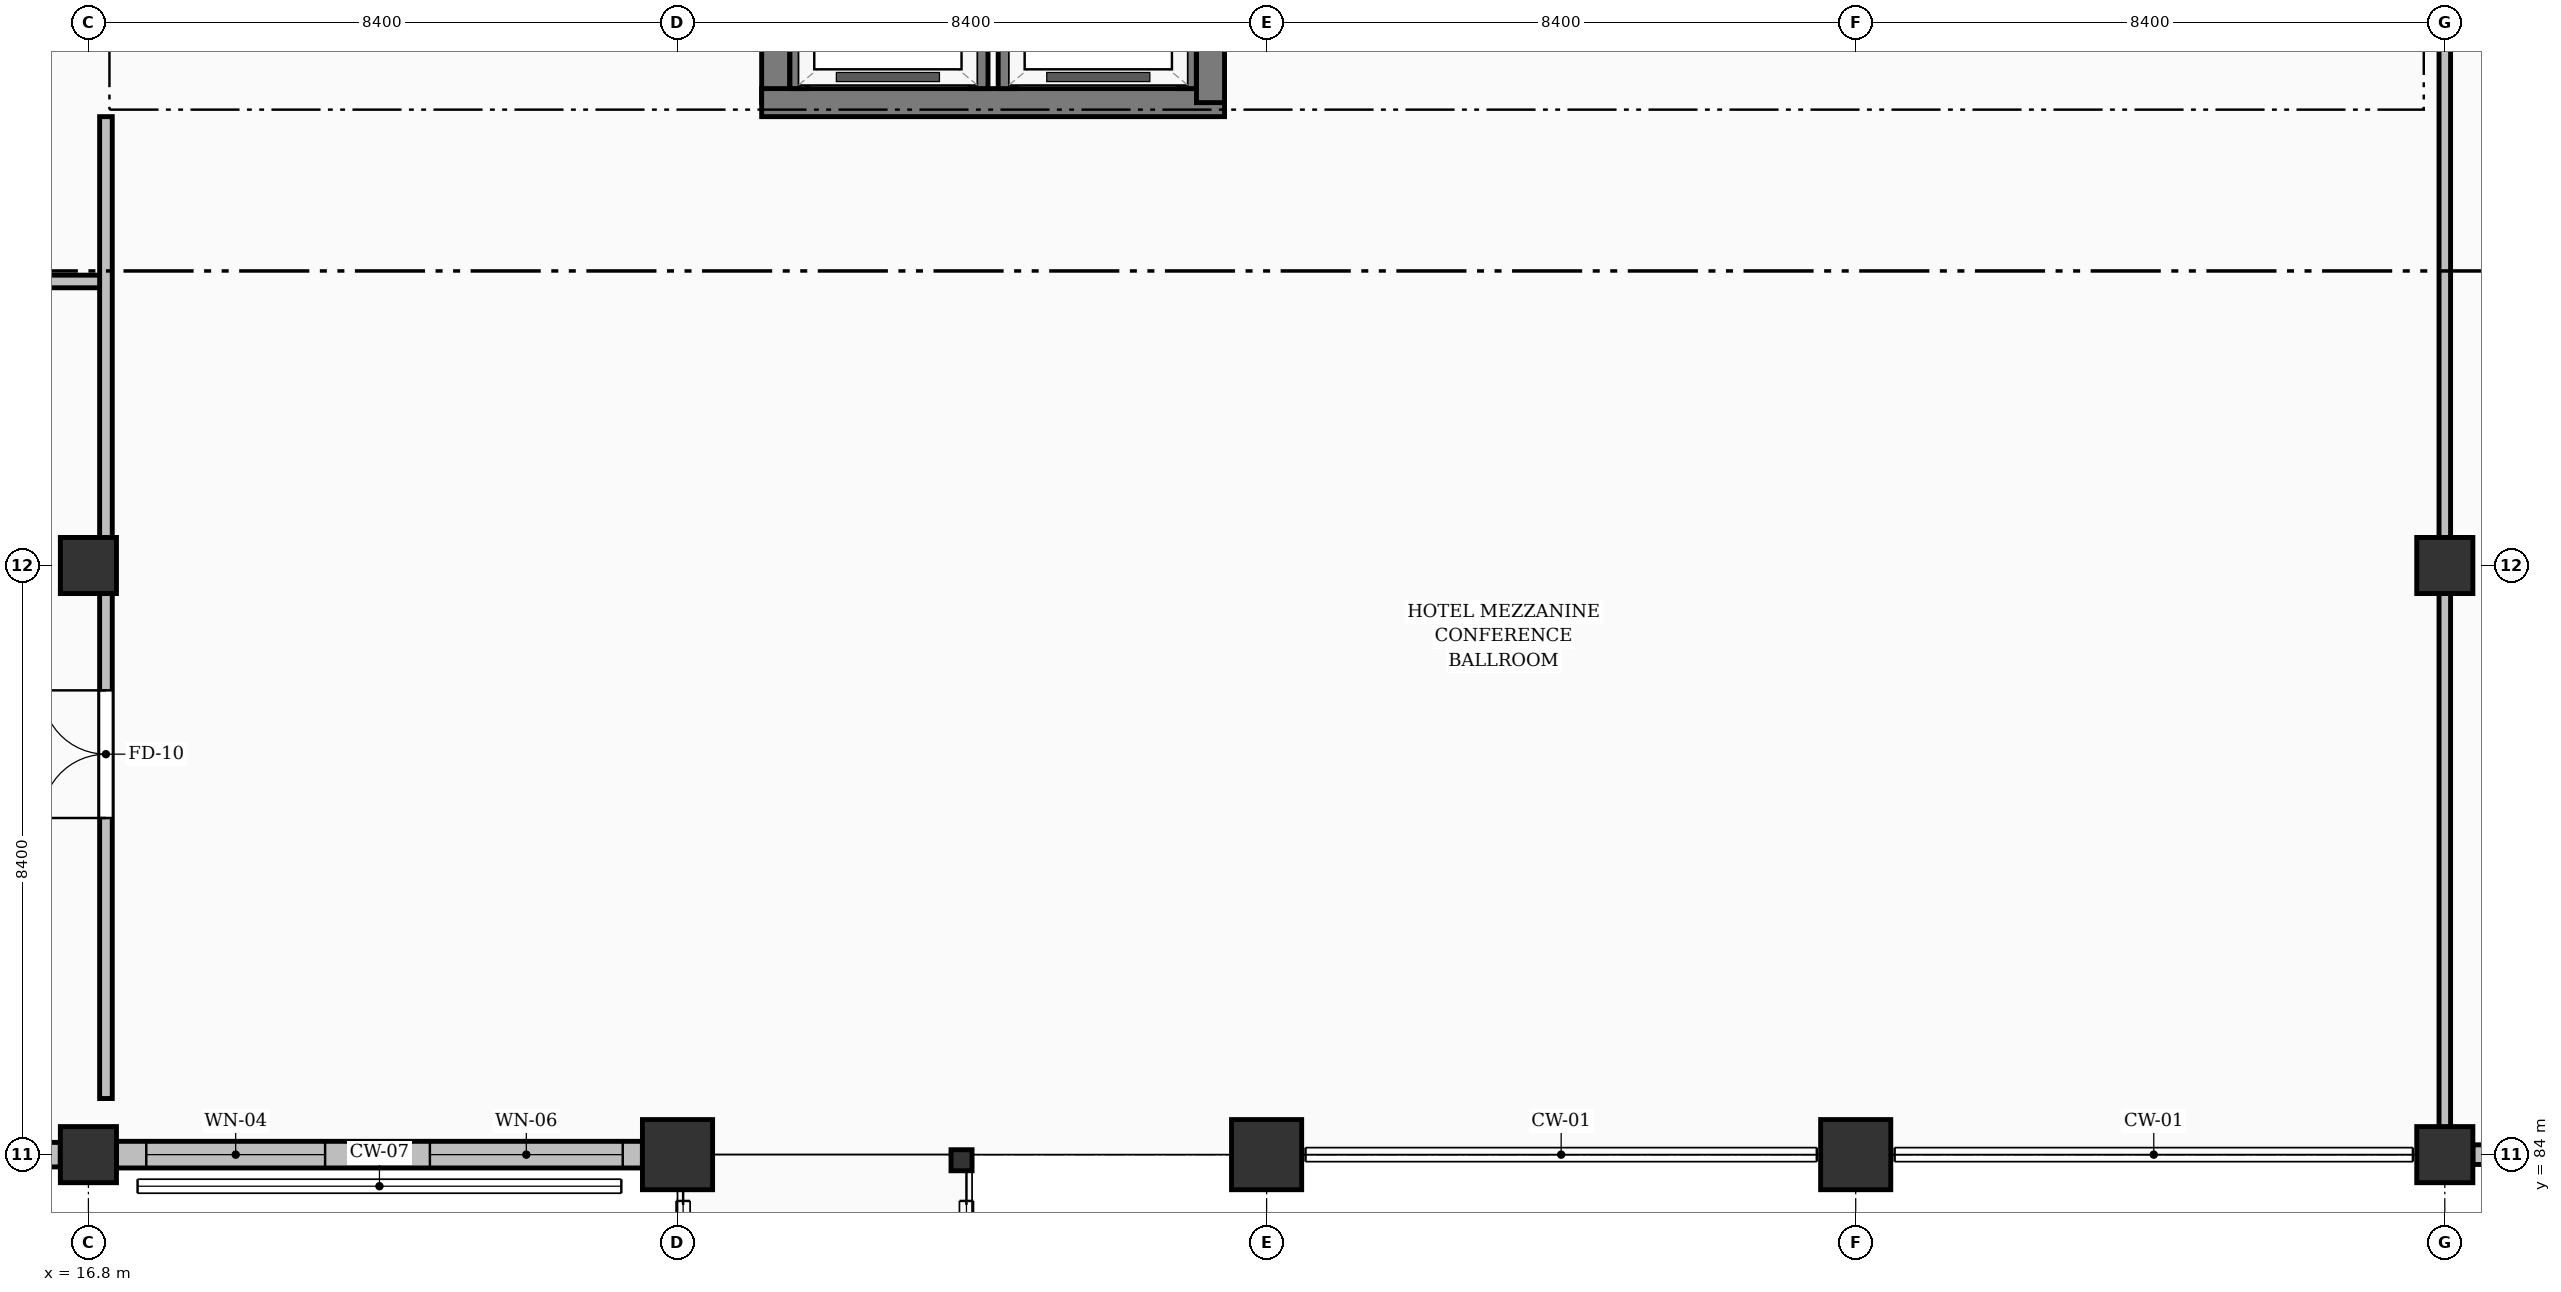
"""IFC4 building model, lengths in metres.
Left out: names, types, materials, properties, quantities, classifications, styles, units other than length and angle.
Written with IfcOpenShell. Run it as: python <this file> out.ifc"""

import sys

from ifc_helpers import new_model, si_unit, direction, frame, frame_2d, origin, origin_2d, place, context, subcontext, project, spatial, rectangle, hollow_rectangle, extrude, element, fill, save


model = new_model("IFC4")
c1 = context("Model", 3, precision=1e-05, world=origin(), true_north=direction((0.0, 1.0)))
c2 = subcontext(c1, "Body", "Model", "MODEL_VIEW")
j1 = project(units=[si_unit("LENGTHUNIT", "METRE"), si_unit("PLANEANGLEUNIT", "RADIAN")], contexts=[c1])
p1 = place(None, origin())
s1 = spatial("IfcSite", under=j1, at=p1, CompositionType="ELEMENT")
p2 = place(p1, origin())
s2 = spatial("IfcBuilding", under=s1, at=p2, CompositionType="ELEMENT")
p3 = place(p2, frame((0.0, 0.0, 3.92)))
s3 = spatial("IfcBuildingStorey", under=s2, at=p3, CompositionType="ELEMENT", Elevation=3.92)
for number, where, z_axis, x_axis in (
    (1, (16.8, 84.0, 0.0), (0.0, 0.0, 1.0), (1.0, 0.0, 0.0)),
    (2, (16.8, 92.4, 0.0), (0.0, 0.0, 1.0), (1.0, 0.0, 0.0)),
):
    element("IfcColumn", number, at=place(p3, frame(where, z_axis=z_axis, x_axis=x_axis)), inside=s3, PredefinedType="COLUMN", context=c2, shape_type="SweptSolid", body=[
        extrude(rectangle(XDim=0.8, YDim=0.8, at=origin_2d()), origin(), (0.0, 0.0, 1.0), 3.64),
    ])
for number, where, z_axis, x_axis in (
    (3, (25.2, 84.0, 0.0), (0.0, 0.0, 1.0), (1.0, 0.0, 0.0)),
    (4, (33.6, 84.0, 0.0), (0.0, 0.0, 1.0), (1.0, 0.0, 0.0)),
    (5, (42.0, 84.0, 0.0), (0.0, 0.0, 1.0), (1.0, 0.0, 0.0)),
):
    element("IfcColumn", number, at=place(p3, frame(where, z_axis=z_axis, x_axis=x_axis)), inside=s3, PredefinedType="COLUMN", context=c2, shape_type="SweptSolid", body=[
        extrude(rectangle(XDim=1.0, YDim=1.0, at=origin_2d()), origin(), (0.0, 0.0, 1.0), 3.64),
    ])
for number, where, z_axis, x_axis in (
    (6, (50.4, 84.0, 0.0), (0.0, 0.0, 1.0), (1.0, 0.0, 0.0)),
    (7, (50.4, 92.4, 0.0), (0.0, 0.0, 1.0), (1.0, 0.0, 0.0)),
):
    element("IfcColumn", number, at=place(p3, frame(where, z_axis=z_axis, x_axis=x_axis)), inside=s3, PredefinedType="COLUMN", context=c2, shape_type="SweptSolid", body=[
        extrude(rectangle(XDim=0.8, YDim=0.8, at=origin_2d()), origin(), (0.0, 0.0, 1.0), 3.64),
    ])
p4 = place(p3, frame((26.6, 99.0, 0.0), z_axis=(0.0, 0.0, 1.0), x_axis=(0.0, 1.0, 0.0)))
e8 = element("IfcWall", 8, at=p4, inside=s3, PredefinedType="SHEAR", context=c2, shape_type="SweptSolid", body=[
    extrude(rectangle(XDim=6.15, YDim=0.4, at=frame_2d((3.075, 0.0))), origin(), (0.0, 0.0, 1.0), 3.36),
])
p5 = place(p3, frame((26.4, 99.0, 0.0), z_axis=(0.0, 0.0, 1.0), x_axis=(1.0, 0.0, 0.0)))
e9 = element("IfcWall", 9, at=p5, inside=s3, PredefinedType="SHEAR", context=c2, shape_type="SweptSolid", body=[
    extrude(rectangle(XDim=6.6, YDim=0.4, at=frame_2d((3.3, 0.0))), origin(), (0.0, 0.0, 1.0), 3.36),
])
p6 = place(p3, frame((32.8, 99.0, 0.0), z_axis=(0.0, 0.0, 1.0), x_axis=(0.0, 1.0, 0.0)))
e10 = element("IfcWall", 10, at=p6, inside=s3, PredefinedType="SHEAR", context=c2, shape_type="SweptSolid", body=[
    extrude(rectangle(XDim=6.15, YDim=0.4, at=frame_2d((3.075, 0.0))), origin(), (0.0, 0.0, 1.0), 3.36),
])
p7 = place(p3, frame((29.25, 83.92, 0.0), z_axis=(0.0, 0.0, 1.0), x_axis=(1.0, 0.0, 0.0)))
e11 = element("IfcColumn", 11, at=p7, inside=s3, PredefinedType="COLUMN", context=c2, shape_type="SweptSolid", body=[
    extrude(hollow_rectangle(XDim=0.3, YDim=0.3, WallThickness=0.016, at=origin_2d()), origin(), (0.0, 0.0, 1.0), 3.64),
])
p8 = place(p3, frame((8.801, 84.0, 0.0), z_axis=(0.0, 0.0, 1.0), x_axis=(1.0, 0.0, 0.0)))
e12 = element("IfcWall", 12, at=p8, inside=s3, PredefinedType="SOLIDWALL", context=c2, shape_type="SweptSolid", body=[
    extrude(rectangle(XDim=7.598, YDim=0.35, at=frame_2d((3.799, 0.0))), origin(), (0.0, 0.0, 1.0), 2.445),
])
p9 = place(p8, frame((0.924, 0.0, 0.0)))
e13 = element("IfcOpeningElement", 13, at=p9, cuts=e12, PredefinedType="OPENING", context=c2, shape_type="SweptSolid", body=[
    extrude(rectangle(XDim=1.65, YDim=2.08, at=frame_2d((0.825, 1.04))), frame((0.0, 0.185, 0.0), z_axis=(0.0, -1.0, 0.0), x_axis=(1.0, 0.0, 0.0)), (0.0, 0.0, 1.0), 0.37),
])
p10 = place(p8, frame((4.549, 0.0, 0.25)))
e14 = element("IfcOpeningElement", 14, at=p10, cuts=e12, PredefinedType="OPENING", context=c2, shape_type="SweptSolid", body=[
    extrude(rectangle(XDim=2.4, YDim=1.75, at=frame_2d((1.2, 0.875))), frame((0.0, 0.185, 0.0), z_axis=(0.0, -1.0, 0.0), x_axis=(1.0, 0.0, 0.0)), (0.0, 0.0, 1.0), 0.37),
])
p11 = place(p3, frame((17.201, 84.0, 0.0), z_axis=(0.0, 0.0, 1.0), x_axis=(1.0, 0.0, 0.0)))
e15 = element("IfcWall", 15, at=p11, inside=s3, PredefinedType="SOLIDWALL", context=c2, shape_type="SweptSolid", body=[
    extrude(rectangle(XDim=7.498, YDim=0.38, at=frame_2d((3.749, 0.0))), origin(), (0.0, 0.0, 1.0), 2.445),
])
p12 = place(p11, frame((0.424, 0.0, 0.25)))
e16 = element("IfcOpeningElement", 16, at=p12, cuts=e15, PredefinedType="OPENING", context=c2, shape_type="SweptSolid", body=[
    extrude(rectangle(XDim=2.55, YDim=1.85, at=frame_2d((1.275, 0.925))), frame((0.0, 0.2, 0.0), z_axis=(0.0, -1.0, 0.0), x_axis=(1.0, 0.0, 0.0)), (0.0, 0.0, 1.0), 0.4),
])
p13 = place(p11, frame((4.468, 0.0, 0.25)))
e17 = element("IfcOpeningElement", 17, at=p13, cuts=e15, PredefinedType="OPENING", context=c2, shape_type="SweptSolid", body=[
    extrude(rectangle(XDim=2.75, YDim=1.85, at=frame_2d((1.375, 0.925))), frame((0.0, 0.2, 0.0), z_axis=(0.0, -1.0, 0.0), x_axis=(1.0, 0.0, 0.0)), (0.0, 0.0, 1.0), 0.4),
])
p14 = place(p3, frame((50.801, 84.0, 0.0), z_axis=(0.0, 0.0, 1.0), x_axis=(1.0, 0.0, 0.0)))
e18 = element("IfcWall", 18, at=p14, inside=s3, PredefinedType="SOLIDWALL", context=c2, shape_type="SweptSolid", body=[
    extrude(rectangle(XDim=7.598, YDim=0.28, at=frame_2d((3.799, 0.0))), origin(), (0.0, 0.0, 1.0), 2.445),
])
p15 = place(p14, frame((0.489, 0.0, 0.25)))
e19 = element("IfcOpeningElement", 19, at=p15, cuts=e18, PredefinedType="OPENING", context=c2, shape_type="SweptSolid", body=[
    extrude(rectangle(XDim=2.42, YDim=1.9, at=frame_2d((1.21, 0.95))), frame((0.0, 0.15, 0.0), z_axis=(0.0, -1.0, 0.0), x_axis=(1.0, 0.0, 0.0)), (0.0, 0.0, 1.0), 0.3),
])
p16 = place(p14, frame((4.709, 0.0, 0.25)))
e20 = element("IfcOpeningElement", 20, at=p16, cuts=e18, PredefinedType="OPENING", context=c2, shape_type="SweptSolid", body=[
    extrude(rectangle(XDim=2.38, YDim=2.0, at=frame_2d((1.19, 1.0))), frame((0.0, 0.15, 0.0), z_axis=(0.0, -1.0, 0.0), x_axis=(1.0, 0.0, 0.0)), (0.0, 0.0, 1.0), 0.3),
])
for number, where, z_axis, x_axis in (
    (21, (26.93, 99.2, 0.0), (0.0, 0.0, 1.0), (0.0, 1.0, 0.0)),
    (22, (29.5, 99.2, 0.0), (0.0, 0.0, 1.0), (0.0, 1.0, 0.0)),
    (23, (29.9, 99.2, 0.0), (0.0, 0.0, 1.0), (0.0, 1.0, 0.0)),
    (24, (32.47, 99.2, 0.0), (0.0, 0.0, 1.0), (0.0, 1.0, 0.0)),
):
    element("IfcWall", number, at=place(p3, frame(where, z_axis=z_axis, x_axis=x_axis)), inside=s3, PredefinedType="SOLIDWALL", context=c2, shape_type="SweptSolid", body=[
        extrude(rectangle(XDim=2.2, YDim=0.255, at=frame_2d((1.1, 0.0))), origin(), (0.0, 0.0, 1.0), 3.36),
    ])
p17 = place(p3, frame((0.175, 96.45, 0.0), z_axis=(0.0, 0.0, 1.0), x_axis=(1.0, 0.0, 0.0)))
e25 = element("IfcWall", 25, at=p17, inside=s3, PredefinedType="PARTITIONING", context=c2, shape_type="SweptSolid", body=[
    extrude(rectangle(XDim=16.875, YDim=0.18, at=frame_2d((8.438, 0.0))), origin(), (0.0, 0.0, 1.0), 3.36),
])
p18 = place(p17, frame((1.195, 0.0, 0.0)))
e26 = element("IfcOpeningElement", 26, at=p18, cuts=e25, PredefinedType="OPENING", context=c2, shape_type="SweptSolid", body=[
    extrude(rectangle(XDim=0.96, YDim=2.15, at=frame_2d((0.48, 1.075))), frame((0.0, 0.1, 0.0), z_axis=(0.0, -1.0, 0.0), x_axis=(1.0, 0.0, 0.0)), (0.0, 0.0, 1.0), 0.2),
])
p19 = place(p17, frame((5.855, 0.0, 0.0)))
e27 = element("IfcOpeningElement", 27, at=p19, cuts=e25, PredefinedType="OPENING", context=c2, shape_type="SweptSolid", body=[
    extrude(rectangle(XDim=0.96, YDim=2.15, at=frame_2d((0.48, 1.075))), frame((0.0, 0.1, 0.0), z_axis=(0.0, -1.0, 0.0), x_axis=(1.0, 0.0, 0.0)), (0.0, 0.0, 1.0), 0.2),
])
p20 = place(p17, frame((9.595, 0.0, 0.0)))
e28 = element("IfcOpeningElement", 28, at=p20, cuts=e25, PredefinedType="OPENING", context=c2, shape_type="SweptSolid", body=[
    extrude(rectangle(XDim=0.96, YDim=2.15, at=frame_2d((0.48, 1.075))), frame((0.0, 0.1, 0.0), z_axis=(0.0, -1.0, 0.0), x_axis=(1.0, 0.0, 0.0)), (0.0, 0.0, 1.0), 0.2),
])
p21 = place(p17, frame((14.255, 0.0, 0.0)))
e29 = element("IfcOpeningElement", 29, at=p21, cuts=e25, PredefinedType="OPENING", context=c2, shape_type="SweptSolid", body=[
    extrude(rectangle(XDim=0.96, YDim=2.15, at=frame_2d((0.48, 1.075))), frame((0.0, 0.1, 0.0), z_axis=(0.0, -1.0, 0.0), x_axis=(1.0, 0.0, 0.0)), (0.0, 0.0, 1.0), 0.2),
])
p22 = place(p3, frame((17.05, 84.8, 0.0), z_axis=(0.0, 0.0, 1.0), x_axis=(0.0, 1.0, 0.0)))
e30 = element("IfcWall", 30, at=p22, inside=s3, PredefinedType="PARTITIONING", context=c2, shape_type="SweptSolid", body=[
    extrude(rectangle(XDim=14.0, YDim=0.18, at=frame_2d((7.0, 0.0))), origin(), (0.0, 0.0, 1.0), 2.395),
])
p23 = place(p22, frame((4.0, 0.0, 0.0)))
e31 = element("IfcOpeningElement", 31, at=p23, cuts=e30, PredefinedType="OPENING", context=c2, shape_type="SweptSolid", body=[
    extrude(rectangle(XDim=1.82, YDim=2.25, at=frame_2d((0.91, 1.125))), frame((0.0, 0.1, 0.0), z_axis=(0.0, -1.0, 0.0), x_axis=(1.0, 0.0, 0.0)), (0.0, 0.0, 1.0), 0.2),
])
p24 = place(p3, frame((50.4, 84.35, 0.0), z_axis=(0.0, 0.0, 1.0), x_axis=(0.0, 1.0, 0.0)))
e32 = element("IfcWall", 32, at=p24, inside=s3, PredefinedType="PARTITIONING", context=c2, shape_type="SweptSolid", body=[
    extrude(rectangle(XDim=20.75, YDim=0.165, at=frame_2d((10.375, 0.0))), origin(), (0.0, 0.0, 1.0), 2.495),
])
p25 = place(p12, origin())
e33 = element("IfcWindow", 33, at=p25, inside=s3, PartitioningType="DOUBLE_PANEL_VERTICAL", PredefinedType="WINDOW", context=c2, shape_type="SweptSolid", body=[
    extrude(rectangle(XDim=2.55, YDim=1.85, at=frame_2d((1.275, 0.925))), frame((0.0, 0.03, 0.0), z_axis=(0.0, -1.0, 0.0), x_axis=(1.0, 0.0, 0.0)), (0.0, 0.0, 1.0), 0.06),
])
fill(e16, e33)
p26 = place(p13, origin())
e34 = element("IfcWindow", 34, at=p26, inside=s3, PartitioningType="DOUBLE_PANEL_VERTICAL", PredefinedType="WINDOW", context=c2, shape_type="SweptSolid", body=[
    extrude(rectangle(XDim=2.75, YDim=1.85, at=frame_2d((1.375, 0.925))), frame((0.0, 0.03, 0.0), z_axis=(0.0, -1.0, 0.0), x_axis=(1.0, 0.0, 0.0)), (0.0, 0.0, 1.0), 0.06),
])
fill(e17, e34)
p27 = place(p23, origin())
e35 = element("IfcDoor", 35, at=p27, inside=s3, OperationType="DOUBLE_DOOR_SINGLE_SWING", PredefinedType="DOOR", context=c2, shape_type="SweptSolid", body=[
    extrude(rectangle(XDim=1.82, YDim=2.25, at=frame_2d((0.91, 1.125))), frame((0.0, 0.025, 0.0), z_axis=(0.0, -1.0, 0.0), x_axis=(1.0, 0.0, 0.0)), (0.0, 0.0, 1.0), 0.05),
])
fill(e31, e35)
save(model, sys.argv[1])
